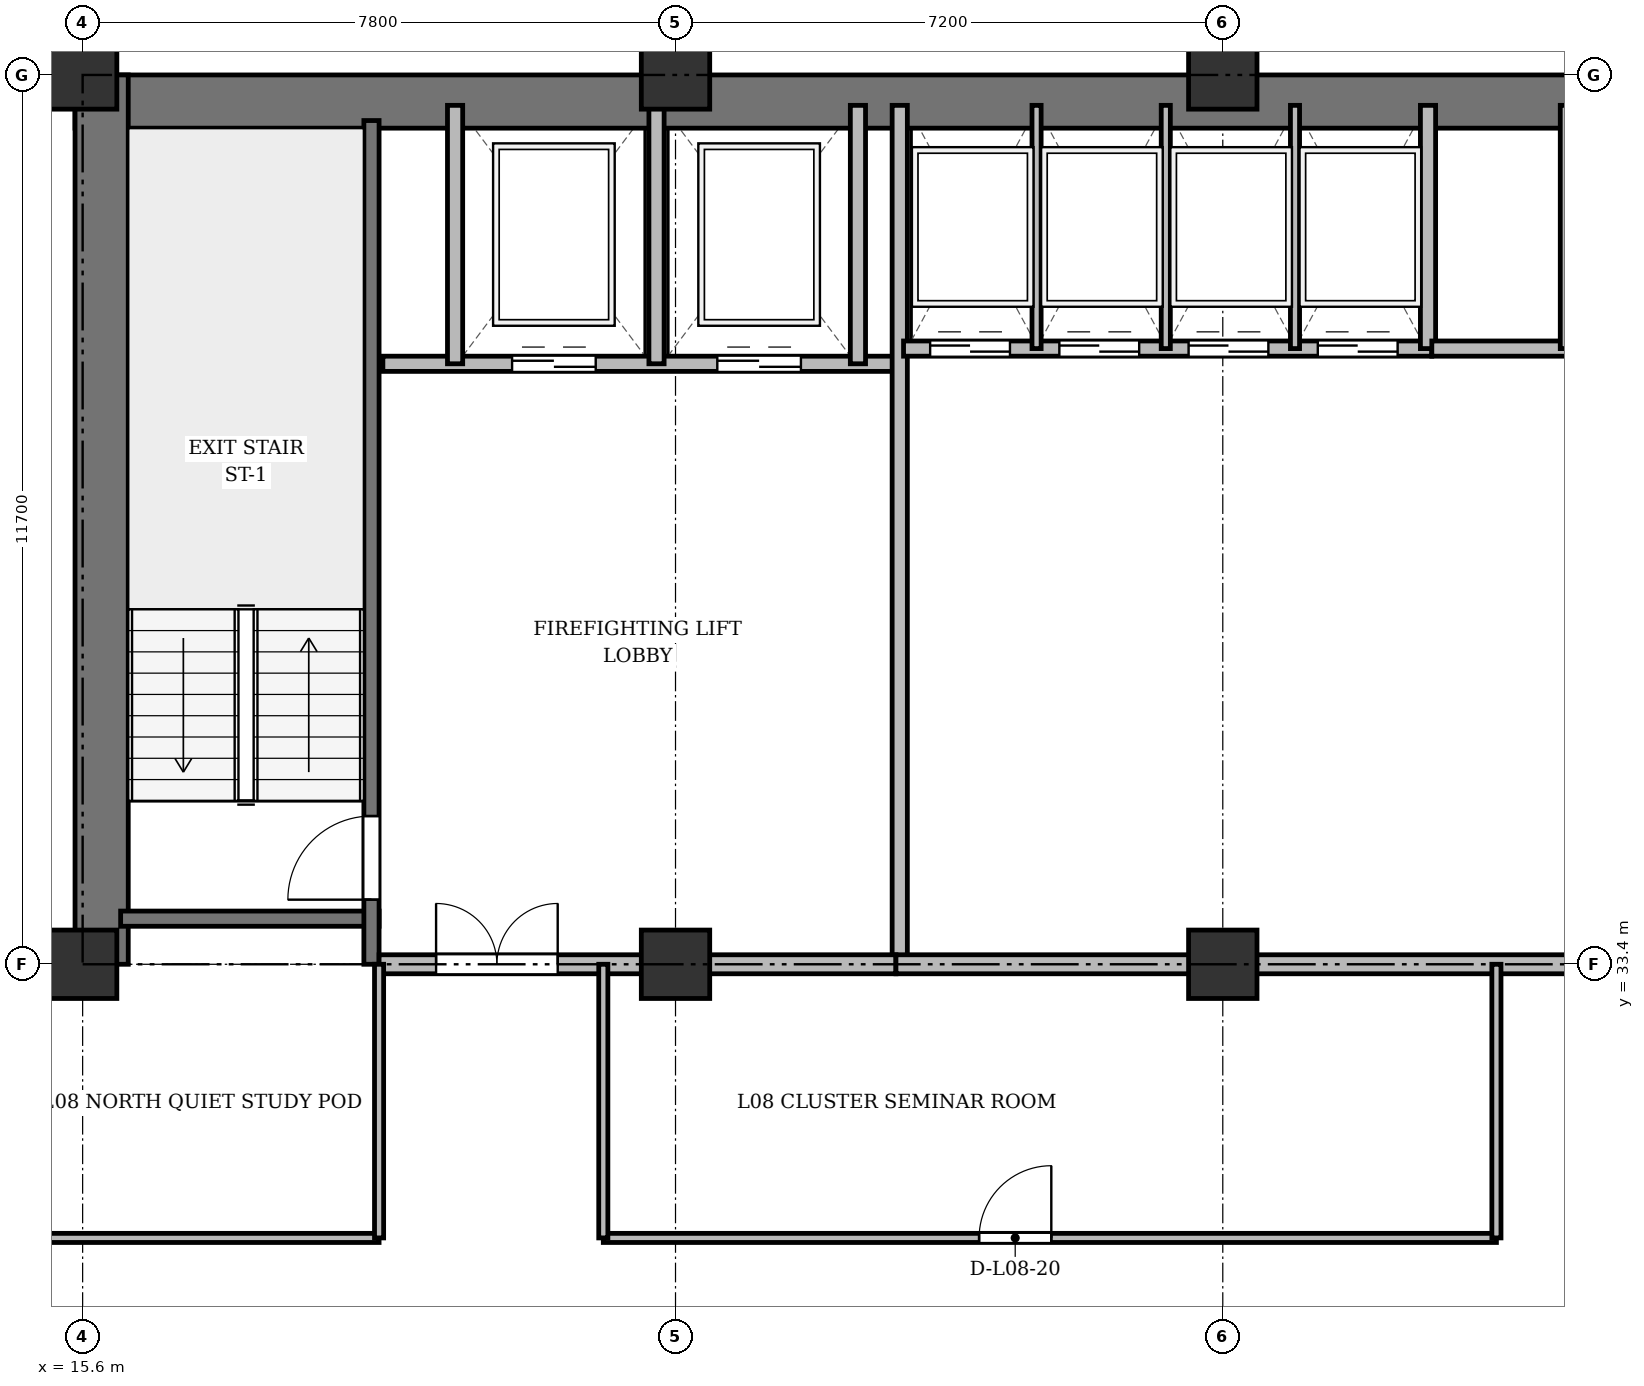
"""IFC4 building model, lengths in metres.
Left out: names, types, materials, properties, quantities, classifications, styles, units other than length and angle.
Written with IfcOpenShell. Run it as: python <this file> out.ifc"""

import sys

from ifc_helpers import new_model, si_unit, direction, frame, frame_2d, origin, origin_2d, place, context, subcontext, project, spatial, rectangle, extrude, source, transform, mapped, element, fill, save


model = new_model("IFC4")
c1 = context("Model", 3, precision=1e-05, world=origin(), true_north=direction((0.0, 1.0)))
c2 = subcontext(c1, "Body", "Model", "MODEL_VIEW")
j1 = project(units=[si_unit("LENGTHUNIT", "METRE"), si_unit("PLANEANGLEUNIT", "RADIAN")], contexts=[c1])
p1 = place(None, origin())
s1 = spatial("IfcSite", under=j1, at=p1, CompositionType="ELEMENT")
p2 = place(p1, origin())
s2 = spatial("IfcBuilding", under=s1, at=p2, CompositionType="ELEMENT")
p3 = place(p2, frame((0.0, 0.0, 34.3)))
s3 = spatial("IfcBuildingStorey", under=s2, at=p3, CompositionType="ELEMENT", Elevation=34.3)
m1 = source(origin(), c2, "Body", "SweptSolid", [
    extrude(rectangle(XDim=0.9, YDim=0.9, at=origin_2d()), origin(), (0.0, 0.0, 1.0), 3.6),
])
for number, where, z_axis, x_axis in (
    (1, (15.6, 33.4, 0.0), (0.0, 0.0, 1.0), (1.0, 0.0, 0.0)),
    (2, (15.6, 45.1, 0.0), (0.0, 0.0, 1.0), (1.0, 0.0, 0.0)),
    (3, (23.4, 33.4, 0.0), (0.0, 0.0, 1.0), (1.0, 0.0, 0.0)),
    (4, (23.4, 45.1, 0.0), (0.0, 0.0, 1.0), (1.0, 0.0, 0.0)),
    (5, (30.6, 33.4, 0.0), (0.0, 0.0, 1.0), (1.0, 0.0, 0.0)),
    (6, (30.6, 45.1, 0.0), (0.0, 0.0, 1.0), (1.0, 0.0, 0.0)),
):
    element("IfcColumn", number, at=place(p3, frame(where, z_axis=z_axis, x_axis=x_axis)), inside=s3, PredefinedType="COLUMN", context=c2, shape_type="MappedRepresentation", body=[
        mapped(m1, transform((0.0, 0.0, 0.0), x_axis=(1.0, 0.0, 0.0), y_axis=(0.0, 1.0, 0.0), z_axis=(0.0, 0.0, 1.0), scale=1.0)),
    ])
p4 = place(p3, frame((15.5, 44.75, 0.0), z_axis=(0.0, 0.0, 1.0), x_axis=(1.0, 0.0, 0.0)))
e7 = element("IfcWall", 7, at=p4, inside=s3, PredefinedType="SHEAR", context=c2, shape_type="SweptSolid", body=[
    extrude(rectangle(XDim=43.4, YDim=0.7, at=frame_2d((21.7, 0.0))), origin(), (0.0, 0.0, 1.0), 3.34),
])
p5 = place(p3, frame((15.85, 33.4, 0.0), z_axis=(0.0, 0.0, 1.0), x_axis=(0.0, 1.0, 0.0)))
e8 = element("IfcWall", 8, at=p5, inside=s3, PredefinedType="SHEAR", context=c2, shape_type="SweptSolid", body=[
    extrude(rectangle(XDim=11.7, YDim=0.7, at=frame_2d((5.85, 0.0))), origin(), (0.0, 0.0, 1.0), 3.34),
])
p6 = place(p3, frame((16.1, 34.0, 0.0), z_axis=(0.0, 0.0, 1.0), x_axis=(1.0, 0.0, 0.0)))
e9 = element("IfcWall", 9, at=p6, inside=s3, PredefinedType="SHEAR", context=c2, shape_type="SweptSolid", body=[
    extrude(rectangle(XDim=3.4, YDim=0.2, at=frame_2d((1.7, 0.0))), origin(), (0.0, 0.0, 1.0), 3.34),
])
p7 = place(p3, frame((19.4, 33.4, 0.0), z_axis=(0.0, 0.0, 1.0), x_axis=(0.0, 1.0, 0.0)))
e10 = element("IfcWall", 10, at=p7, inside=s3, PredefinedType="SHEAR", context=c2, shape_type="SweptSolid", body=[
    extrude(rectangle(XDim=11.1, YDim=0.2, at=frame_2d((5.55, 0.0))), origin(), (0.0, 0.0, 1.0), 3.34),
])
p8 = place(p7, frame((0.85, 0.0, 0.0)))
e11 = element("IfcOpeningElement", 11, at=p8, cuts=e10, PredefinedType="OPENING", context=c2, shape_type="SweptSolid", body=[
    extrude(rectangle(XDim=1.1, YDim=2.15, at=frame_2d((0.55, 1.075))), frame((0.0, 0.11, 0.0), z_axis=(0.0, -1.0, 0.0), x_axis=(1.0, 0.0, 0.0)), (0.0, 0.0, 1.0), 0.22),
])
p9 = place(p3, frame((19.55, 41.3, 0.0), z_axis=(0.0, 0.0, 1.0), x_axis=(1.0, 0.0, 0.0)))
e12 = element("IfcWall", 12, at=p9, inside=s3, PredefinedType="SOLIDWALL", context=c2, shape_type="SweptSolid", body=[
    extrude(rectangle(XDim=6.75, YDim=0.2, at=frame_2d((3.375, 0.0))), origin(), (0.0, 0.0, 1.0), 3.34),
])
p10 = place(p9, frame((1.7, 0.0, 0.0)))
e13 = element("IfcOpeningElement", 13, at=p10, cuts=e12, PredefinedType="OPENING", context=c2, shape_type="SweptSolid", body=[
    extrude(rectangle(XDim=1.1, YDim=2.15, at=frame_2d((0.55, 1.075))), frame((0.0, 0.11, 0.0), z_axis=(0.0, -1.0, 0.0), x_axis=(1.0, 0.0, 0.0)), (0.0, 0.0, 1.0), 0.22),
])
p11 = place(p9, frame((4.4, 0.0, 0.0)))
e14 = element("IfcOpeningElement", 14, at=p11, cuts=e12, PredefinedType="OPENING", context=c2, shape_type="SweptSolid", body=[
    extrude(rectangle(XDim=1.1, YDim=2.15, at=frame_2d((0.55, 1.075))), frame((0.0, 0.11, 0.0), z_axis=(0.0, -1.0, 0.0), x_axis=(1.0, 0.0, 0.0)), (0.0, 0.0, 1.0), 0.22),
])
for number, where, z_axis, x_axis in (
    (15, (20.5, 41.3, 0.0), (0.0, 0.0, 1.0), (0.0, 1.0, 0.0)),
    (16, (23.15, 41.3, 0.0), (0.0, 0.0, 1.0), (0.0, 1.0, 0.0)),
    (17, (25.8, 41.3, 0.0), (0.0, 0.0, 1.0), (0.0, 1.0, 0.0)),
):
    element("IfcWall", number, at=place(p3, frame(where, z_axis=z_axis, x_axis=x_axis)), inside=s3, PredefinedType="SOLIDWALL", context=c2, shape_type="SweptSolid", body=[
        extrude(rectangle(XDim=3.4, YDim=0.2, at=frame_2d((1.7, 0.0))), origin(), (0.0, 0.0, 1.0), 3.34),
    ])
p12 = place(p3, frame((26.35, 33.4, 0.0), z_axis=(0.0, 0.0, 1.0), x_axis=(0.0, 1.0, 0.0)))
e18 = element("IfcWall", 18, at=p12, inside=s3, PredefinedType="SOLIDWALL", context=c2, shape_type="SweptSolid", body=[
    extrude(rectangle(XDim=11.3, YDim=0.2, at=frame_2d((5.65, 0.0))), origin(), (0.0, 0.0, 1.0), 2.69),
])
p13 = place(p3, frame((19.5, 33.4, 0.0), z_axis=(0.0, 0.0, 1.0), x_axis=(1.0, 0.0, 0.0)))
e19 = element("IfcWall", 19, at=p13, inside=s3, PredefinedType="PARTITIONING", context=c2, shape_type="SweptSolid", body=[
    extrude(rectangle(XDim=6.8, YDim=0.25, at=frame_2d((3.4, 0.0))), origin(), (0.0, 0.0, 1.0), 2.69),
])
p14 = place(p13, frame((0.75, 0.0, 0.0)))
e20 = element("IfcOpeningElement", 20, at=p14, cuts=e19, PredefinedType="OPENING", context=c2, shape_type="SweptSolid", body=[
    extrude(rectangle(XDim=1.6, YDim=2.2, at=frame_2d((0.8, 1.1))), frame((0.0, 0.135, 0.0), z_axis=(0.0, -1.0, 0.0), x_axis=(1.0, 0.0, 0.0)), (0.0, 0.0, 1.0), 0.27),
])
p15 = place(p3, frame((26.4, 41.5, 0.0), z_axis=(0.0, 0.0, 1.0), x_axis=(1.0, 0.0, 0.0)))
e21 = element("IfcWall", 21, at=p15, inside=s3, PredefinedType="SOLIDWALL", context=c2, shape_type="SweptSolid", body=[
    extrude(rectangle(XDim=6.95, YDim=0.2, at=frame_2d((3.475, 0.0))), origin(), (0.0, 0.0, 1.0), 3.34),
])
p16 = place(p15, frame((0.35, 0.0, 0.0)))
e22 = element("IfcOpeningElement", 22, at=p16, cuts=e21, PredefinedType="OPENING", context=c2, shape_type="SweptSolid", body=[
    extrude(rectangle(XDim=1.05, YDim=2.15, at=frame_2d((0.525, 1.075))), frame((0.0, 0.11, 0.0), z_axis=(0.0, -1.0, 0.0), x_axis=(1.0, 0.0, 0.0)), (0.0, 0.0, 1.0), 0.22),
])
p17 = place(p15, frame((2.05, 0.0, 0.0)))
e23 = element("IfcOpeningElement", 23, at=p17, cuts=e21, PredefinedType="OPENING", context=c2, shape_type="SweptSolid", body=[
    extrude(rectangle(XDim=1.05, YDim=2.15, at=frame_2d((0.525, 1.075))), frame((0.0, 0.11, 0.0), z_axis=(0.0, -1.0, 0.0), x_axis=(1.0, 0.0, 0.0)), (0.0, 0.0, 1.0), 0.22),
])
p18 = place(p15, frame((3.75, 0.0, 0.0)))
e24 = element("IfcOpeningElement", 24, at=p18, cuts=e21, PredefinedType="OPENING", context=c2, shape_type="SweptSolid", body=[
    extrude(rectangle(XDim=1.05, YDim=2.15, at=frame_2d((0.525, 1.075))), frame((0.0, 0.11, 0.0), z_axis=(0.0, -1.0, 0.0), x_axis=(1.0, 0.0, 0.0)), (0.0, 0.0, 1.0), 0.22),
])
p19 = place(p15, frame((5.45, 0.0, 0.0)))
e25 = element("IfcOpeningElement", 25, at=p19, cuts=e21, PredefinedType="OPENING", context=c2, shape_type="SweptSolid", body=[
    extrude(rectangle(XDim=1.05, YDim=2.15, at=frame_2d((0.525, 1.075))), frame((0.0, 0.11, 0.0), z_axis=(0.0, -1.0, 0.0), x_axis=(1.0, 0.0, 0.0)), (0.0, 0.0, 1.0), 0.22),
])
p20 = place(p3, frame((33.3, 41.5, 0.0), z_axis=(0.0, 0.0, 1.0), x_axis=(0.0, 1.0, 0.0)))
e26 = element("IfcWall", 26, at=p20, inside=s3, PredefinedType="SOLIDWALL", context=c2, shape_type="SweptSolid", body=[
    extrude(rectangle(XDim=3.2, YDim=0.2, at=frame_2d((1.6, 0.0))), origin(), (0.0, 0.0, 1.0), 3.34),
])
for number, where, z_axis, x_axis in (
    (27, (28.15, 41.5, 0.0), (0.0, 0.0, 1.0), (0.0, 1.0, 0.0)),
    (28, (29.85, 41.5, 0.0), (0.0, 0.0, 1.0), (0.0, 1.0, 0.0)),
    (29, (31.55, 41.5, 0.0), (0.0, 0.0, 1.0), (0.0, 1.0, 0.0)),
):
    element("IfcWall", number, at=place(p3, frame(where, z_axis=z_axis, x_axis=x_axis)), inside=s3, PredefinedType="PARTITIONING", context=c2, shape_type="SweptSolid", body=[
        extrude(rectangle(XDim=3.2, YDim=0.12, at=frame_2d((1.6, 0.0))), origin(), (0.0, 0.0, 1.0), 3.34),
    ])
p21 = place(p3, frame((33.35, 41.5, 0.0), z_axis=(0.0, 0.0, 1.0), x_axis=(1.0, 0.0, 0.0)))
e30 = element("IfcWall", 30, at=p21, inside=s3, PredefinedType="SOLIDWALL", context=c2, shape_type="SweptSolid", body=[
    extrude(rectangle(XDim=6.9, YDim=0.2, at=frame_2d((3.45, 0.0))), origin(), (0.0, 0.0, 1.0), 3.34),
])
p22 = place(p3, frame((35.1, 41.5, 0.0), z_axis=(0.0, 0.0, 1.0), x_axis=(0.0, 1.0, 0.0)))
e31 = element("IfcWall", 31, at=p22, inside=s3, PredefinedType="PARTITIONING", context=c2, shape_type="SweptSolid", body=[
    extrude(rectangle(XDim=3.2, YDim=0.12, at=frame_2d((1.6, 0.0))), origin(), (0.0, 0.0, 1.0), 3.34),
])
p23 = place(p3, frame((26.3, 33.4, 0.0), z_axis=(0.0, 0.0, 1.0), x_axis=(1.0, 0.0, 0.0)))
e32 = element("IfcWall", 32, at=p23, inside=s3, PredefinedType="PARTITIONING", context=c2, shape_type="SweptSolid", body=[
    extrude(rectangle(XDim=20.85, YDim=0.25, at=frame_2d((10.425, 0.0))), origin(), (0.0, 0.0, 1.0), 2.69),
])
p24 = place(p23, frame((9.2, 0.0, 0.0)))
e33 = element("IfcOpeningElement", 33, at=p24, cuts=e32, PredefinedType="OPENING", context=c2, shape_type="SweptSolid", body=[
    extrude(rectangle(XDim=1.6, YDim=2.2, at=frame_2d((0.8, 1.1))), frame((0.0, 0.135, 0.0), z_axis=(0.0, -1.0, 0.0), x_axis=(1.0, 0.0, 0.0)), (0.0, 0.0, 1.0), 0.27),
])
p25 = place(p3, frame((4.75, 29.8, 0.0), z_axis=(0.0, 0.0, 1.0), x_axis=(1.0, 0.0, 0.0)))
e34 = element("IfcWall", 34, at=p25, inside=s3, PredefinedType="PARTITIONING", context=c2, shape_type="SweptSolid", body=[
    extrude(rectangle(XDim=14.75, YDim=0.12, at=frame_2d((7.375, 0.0))), origin(), (0.0, 0.0, 1.0), 2.752),
])
p26 = place(p25, frame((6.9, 0.0, 0.0)))
e35 = element("IfcOpeningElement", 35, at=p26, cuts=e34, PredefinedType="OPENING", context=c2, shape_type="SweptSolid", body=[
    extrude(rectangle(XDim=0.95, YDim=2.15, at=frame_2d((0.475, 1.075))), frame((0.0, 0.07, 0.0), z_axis=(0.0, -1.0, 0.0), x_axis=(1.0, 0.0, 0.0)), (0.0, 0.0, 1.0), 0.14),
])
p27 = place(p3, frame((22.45, 29.8, 0.0), z_axis=(0.0, 0.0, 1.0), x_axis=(1.0, 0.0, 0.0)))
e36 = element("IfcWall", 36, at=p27, inside=s3, PredefinedType="PARTITIONING", context=c2, shape_type="SweptSolid", body=[
    extrude(rectangle(XDim=11.75, YDim=0.12, at=frame_2d((5.875, 0.0))), origin(), (0.0, 0.0, 1.0), 2.752),
])
p28 = place(p27, frame((4.944, 0.0, 0.0)))
e37 = element("IfcOpeningElement", 37, at=p28, cuts=e36, PredefinedType="OPENING", context=c2, shape_type="SweptSolid", body=[
    extrude(rectangle(XDim=0.95, YDim=2.15, at=frame_2d((0.475, 1.075))), frame((0.0, 0.07, 0.0), z_axis=(0.0, -1.0, 0.0), x_axis=(1.0, 0.0, 0.0)), (0.0, 0.0, 1.0), 0.14),
])
for number, where, z_axis, x_axis in (
    (38, (19.5, 29.8, 0.0), (0.0, 0.0, 1.0), (0.0, 1.0, 0.0)),
    (39, (22.45, 29.8, 0.0), (0.0, 0.0, 1.0), (0.0, 1.0, 0.0)),
    (40, (34.2, 29.8, 0.0), (0.0, 0.0, 1.0), (0.0, 1.0, 0.0)),
):
    element("IfcWall", number, at=place(p3, frame(where, z_axis=z_axis, x_axis=x_axis)), inside=s3, PredefinedType="PARTITIONING", context=c2, shape_type="SweptSolid", body=[
        extrude(rectangle(XDim=3.6, YDim=0.12, at=frame_2d((1.8, 0.0))), origin(), (0.0, 0.0, 1.0), 2.69),
    ])
p29 = place(p3, frame((4.75, 33.4, 0.0), z_axis=(0.0, 0.0, 1.0), x_axis=(1.0, 0.0, 0.0)))
e41 = element("IfcWall", 41, at=p29, inside=s3, PredefinedType="PARTITIONING", context=c2, shape_type="SweptSolid", body=[
    extrude(rectangle(XDim=10.85, YDim=0.15, at=frame_2d((5.425, 0.0))), origin(), (0.0, 0.0, 1.0), 2.69),
])
p30 = place(p29, frame((4.94, 0.0, 0.0)))
e42 = element("IfcOpeningElement", 42, at=p30, cuts=e41, PredefinedType="OPENING", context=c2, shape_type="SweptSolid", body=[
    extrude(rectangle(XDim=0.95, YDim=2.15, at=frame_2d((0.475, 1.075))), frame((0.0, 0.085, 0.0), z_axis=(0.0, -1.0, 0.0), x_axis=(1.0, 0.0, 0.0)), (0.0, 0.0, 1.0), 0.17),
])
p31 = place(p3, frame((15.6, 44.75, 0.0), z_axis=(0.0, 0.0, 1.0), x_axis=(0.0, 1.0, 0.0)))
e43 = element("IfcWall", 43, at=p31, inside=s3, PredefinedType="PARTITIONING", context=c2, shape_type="SweptSolid", body=[
    extrude(rectangle(XDim=3.61, YDim=0.15, at=frame_2d((1.805, 0.0))), origin(), (0.0, 0.0, 1.0), 2.752),
])
p32 = place(p31, frame((1.1, 0.0, 0.0)))
e44 = element("IfcOpeningElement", 44, at=p32, cuts=e43, PredefinedType="OPENING", context=c2, shape_type="SweptSolid", body=[
    extrude(rectangle(XDim=0.95, YDim=2.15, at=frame_2d((0.475, 1.075))), frame((0.0, 0.085, 0.0), z_axis=(0.0, -1.0, 0.0), x_axis=(1.0, 0.0, 0.0)), (0.0, 0.0, 1.0), 0.17),
])
m2 = source(origin(), c2, "Body", "SweptSolid", [
    extrude(rectangle(XDim=1.1, YDim=2.15, at=frame_2d((0.55, 1.075))), frame((0.0, 0.025, 0.0), z_axis=(0.0, -1.0, 0.0), x_axis=(1.0, 0.0, 0.0)), (0.0, 0.0, 1.0), 0.05),
])
p33 = place(p8, origin())
e45 = element("IfcDoor", 45, at=p33, inside=s3, OperationType="SINGLE_SWING_LEFT", PredefinedType="DOOR", context=c2, shape_type="MappedRepresentation", body=[
    mapped(m2, transform((0.0, 0.0, 0.0), x_axis=(1.0, 0.0, 0.0), y_axis=(0.0, 1.0, 0.0), z_axis=(0.0, 0.0, 1.0), scale=1.0)),
])
fill(e11, e45)
p34 = place(p10, origin())
e46 = element("IfcDoor", 46, at=p34, inside=s3, OperationType="DOUBLE_DOOR_SLIDING", PredefinedType="DOOR", context=c2, shape_type="MappedRepresentation", body=[
    mapped(m2, transform((0.0, 0.0, 0.0), x_axis=(1.0, 0.0, 0.0), y_axis=(0.0, 1.0, 0.0), z_axis=(0.0, 0.0, 1.0), scale=1.0)),
])
fill(e13, e46)
p35 = place(p11, origin())
e47 = element("IfcDoor", 47, at=p35, inside=s3, OperationType="DOUBLE_DOOR_SLIDING", PredefinedType="DOOR", context=c2, shape_type="MappedRepresentation", body=[
    mapped(m2, transform((0.0, 0.0, 0.0), x_axis=(1.0, 0.0, 0.0), y_axis=(0.0, 1.0, 0.0), z_axis=(0.0, 0.0, 1.0), scale=1.0)),
])
fill(e14, e47)
m3 = source(origin(), c2, "Body", "SweptSolid", [
    extrude(rectangle(XDim=1.6, YDim=2.2, at=frame_2d((0.8, 1.1))), frame((0.0, 0.025, 0.0), z_axis=(0.0, -1.0, 0.0), x_axis=(1.0, 0.0, 0.0)), (0.0, 0.0, 1.0), 0.05),
])
p36 = place(p14, origin())
e48 = element("IfcDoor", 48, at=p36, inside=s3, OperationType="DOUBLE_DOOR_SINGLE_SWING", PredefinedType="DOOR", context=c2, shape_type="MappedRepresentation", body=[
    mapped(m3, transform((0.0, 0.0, 0.0), x_axis=(1.0, 0.0, 0.0), y_axis=(0.0, 1.0, 0.0), z_axis=(0.0, 0.0, 1.0), scale=1.0)),
])
fill(e20, e48)
m4 = source(origin(), c2, "Body", "SweptSolid", [
    extrude(rectangle(XDim=1.05, YDim=2.15, at=frame_2d((0.525, 1.075))), frame((0.0, 0.025, 0.0), z_axis=(0.0, -1.0, 0.0), x_axis=(1.0, 0.0, 0.0)), (0.0, 0.0, 1.0), 0.05),
])
p37 = place(p16, origin())
e49 = element("IfcDoor", 49, at=p37, inside=s3, OperationType="DOUBLE_DOOR_SLIDING", PredefinedType="DOOR", context=c2, shape_type="MappedRepresentation", body=[
    mapped(m4, transform((0.0, 0.0, 0.0), x_axis=(1.0, 0.0, 0.0), y_axis=(0.0, 1.0, 0.0), z_axis=(0.0, 0.0, 1.0), scale=1.0)),
])
fill(e22, e49)
p38 = place(p17, origin())
e50 = element("IfcDoor", 50, at=p38, inside=s3, OperationType="DOUBLE_DOOR_SLIDING", PredefinedType="DOOR", context=c2, shape_type="MappedRepresentation", body=[
    mapped(m4, transform((0.0, 0.0, 0.0), x_axis=(1.0, 0.0, 0.0), y_axis=(0.0, 1.0, 0.0), z_axis=(0.0, 0.0, 1.0), scale=1.0)),
])
fill(e23, e50)
p39 = place(p18, origin())
e51 = element("IfcDoor", 51, at=p39, inside=s3, OperationType="DOUBLE_DOOR_SLIDING", PredefinedType="DOOR", context=c2, shape_type="MappedRepresentation", body=[
    mapped(m4, transform((0.0, 0.0, 0.0), x_axis=(1.0, 0.0, 0.0), y_axis=(0.0, 1.0, 0.0), z_axis=(0.0, 0.0, 1.0), scale=1.0)),
])
fill(e24, e51)
p40 = place(p19, origin())
e52 = element("IfcDoor", 52, at=p40, inside=s3, OperationType="DOUBLE_DOOR_SLIDING", PredefinedType="DOOR", context=c2, shape_type="MappedRepresentation", body=[
    mapped(m4, transform((0.0, 0.0, 0.0), x_axis=(1.0, 0.0, 0.0), y_axis=(0.0, 1.0, 0.0), z_axis=(0.0, 0.0, 1.0), scale=1.0)),
])
fill(e25, e52)
m5 = source(origin(), c2, "Body", "SweptSolid", [
    extrude(rectangle(XDim=0.95, YDim=2.15, at=frame_2d((0.475, 1.075))), frame((0.0, 0.025, 0.0), z_axis=(0.0, -1.0, 0.0), x_axis=(1.0, 0.0, 0.0)), (0.0, 0.0, 1.0), 0.05),
])
p41 = place(p28, origin())
e53 = element("IfcDoor", 53, at=p41, inside=s3, OperationType="SINGLE_SWING_RIGHT", PredefinedType="DOOR", context=c2, shape_type="MappedRepresentation", body=[
    mapped(m5, transform((0.0, 0.0, 0.0), x_axis=(1.0, 0.0, 0.0), y_axis=(0.0, 1.0, 0.0), z_axis=(0.0, 0.0, 1.0), scale=1.0)),
])
fill(e37, e53)
save(model, sys.argv[1])
